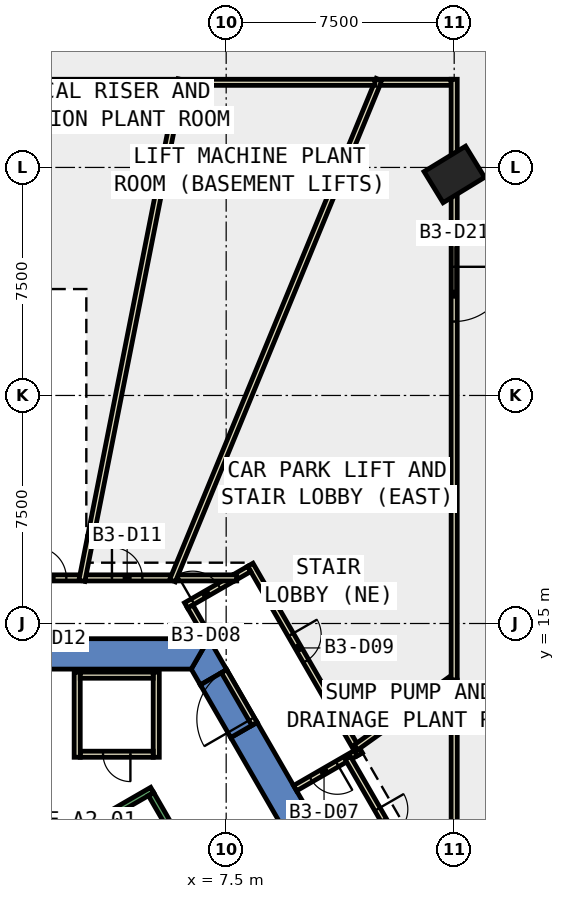
"""IFC4 building model, lengths in metres.
Left out: names, types, materials, properties, quantities, classifications, styles, units other than length and angle.
Written with IfcOpenShell. Run it as: python <this file> out.ifc"""

import sys

from ifc_helpers import new_model, si_unit, direction, frame, frame_2d, origin, origin_2d, place, context, subcontext, project, spatial, polyline, rectangle, outline, extrude, element, fill, save


model = new_model("IFC4")
c1 = context("Model", 3, precision=1e-05, world=origin(), true_north=direction((0.0, 1.0)))
c2 = subcontext(c1, "Body", "Model", "MODEL_VIEW")
j1 = project(units=[si_unit("LENGTHUNIT", "METRE"), si_unit("PLANEANGLEUNIT", "RADIAN")], contexts=[c1])
p1 = place(None, origin())
s1 = spatial("IfcSite", under=j1, at=p1, CompositionType="ELEMENT")
p2 = place(p1, origin())
s2 = spatial("IfcBuilding", under=s1, at=p2, CompositionType="ELEMENT")
p3 = place(p2, frame((0.0, 0.0, -16.5)))
s3 = spatial("IfcBuildingStorey", under=s2, at=p3, CompositionType="ELEMENT", Elevation=-16.5)
p4 = place(p3, frame((15.005, 29.769, -0.4), z_axis=(0.0, 0.0, 1.0), x_axis=(-0.521545830745, 0.853223268806, 0.0)))
e1 = element("IfcColumn", 1, at=p4, inside=s3, PredefinedType="COLUMN", context=c2, shape_type="SweptSolid", body=[
    extrude(rectangle(XDim=1.2, YDim=1.6, at=origin_2d()), origin(), (0.0, 0.0, 1.0), 5.48),
])
p5 = place(p3, origin())
e2 = element("IfcWall", 2, at=p5, inside=s3, PredefinedType="SHEAR", context=c2, shape_type="SweptSolid", body=[
    extrude(outline(polyline([(8.517, 11.748), (7.651, 11.248), (12.702, 2.5), (13.856, 2.5), (8.517, 11.748)])), origin(), (0.0, 0.0, 1.0), 5.08),
])
p6 = place(p3, origin())
e3 = element("IfcWall", 3, at=p6, inside=s3, PredefinedType="SHEAR", context=c2, shape_type="SweptSolid", body=[
    extrude(outline(polyline([(6.651, 12.98), (7.517, 13.48), (6.928, 14.5), (6.351, 13.5), (6.651, 12.98)])), origin(), (0.0, 0.0, 1.0), 5.08),
])
p7 = place(p3, frame((0.0, 0.0, 3.6)))
e4 = element("IfcWall", 4, at=p7, inside=s3, PredefinedType="SHEAR", context=c2, shape_type="SweptSolid", body=[
    extrude(outline(polyline([(7.517, 13.48), (6.651, 12.98), (7.651, 11.248), (8.517, 11.748), (7.517, 13.48)])), origin(), (0.0, 0.0, 1.0), 1.48),
])
p8 = place(p3, origin())
e5 = element("IfcWall", 5, at=p8, inside=s3, PredefinedType="SHEAR", context=c2, shape_type="SweptSolid", body=[
    extrude(outline(polyline([(6.928, 14.5), (-6.928, 14.5), (-6.351, 13.5), (6.351, 13.5), (6.928, 14.5)])), origin(), (0.0, 0.0, 1.0), 5.08),
])
p9 = place(p3, frame((11.845, 10.783, 0.0), z_axis=(0.0, 0.0, 1.0), x_axis=(-0.865973769406, -0.500089422704, 0.0)))
e6 = element("IfcWall", 6, at=p9, inside=s3, PredefinedType="PARTITIONING", context=c2, shape_type="SweptSolid", body=[
    extrude(rectangle(XDim=2.399, YDim=0.2, at=frame_2d((1.2, 0.0))), origin(), (0.0, 0.0, 1.0), 5.08),
])
p10 = place(p9, frame((0.8, 0.0, 0.0)))
e7 = element("IfcOpeningElement", 7, at=p10, cuts=e6, PredefinedType="OPENING", context=c2, shape_type="SweptSolid", body=[
    extrude(rectangle(XDim=1.0, YDim=2.1, at=frame_2d((0.5, 1.05))), frame((0.0, 0.11, 0.0), z_axis=(0.0, -1.0, 0.0), x_axis=(1.0, 0.0, 0.0)), (0.0, 0.0, 1.0), 0.22),
])
p11 = place(p3, frame((6.18, 15.595, 0.0), z_axis=(0.0, 0.0, 1.0), x_axis=(0.866102512622, 0.499866419787, 0.0)))
e8 = element("IfcWall", 8, at=p11, inside=s3, PredefinedType="PARTITIONING", context=c2, shape_type="SweptSolid", body=[
    extrude(rectangle(XDim=1.811, YDim=0.2, at=frame_2d((0.905, 0.0))), origin(), (0.0, 0.0, 1.0), 5.08),
])
p12 = place(p11, frame((0.254, 0.0, 0.0)))
e9 = element("IfcOpeningElement", 9, at=p12, cuts=e8, PredefinedType="OPENING", context=c2, shape_type="SweptSolid", body=[
    extrude(rectangle(XDim=1.0, YDim=2.1, at=frame_2d((0.5, 1.05))), frame((0.0, 0.11, 0.0), z_axis=(0.0, -1.0, 0.0), x_axis=(1.0, 0.0, 0.0)), (0.0, 0.0, 1.0), 0.22),
])
p13 = place(p3, frame((6.317, 15.558, 0.0), z_axis=(0.0, 0.0, 1.0), x_axis=(0.500114474492, -0.865959301817, 0.0)))
e10 = element("IfcWall", 10, at=p13, inside=s3, PredefinedType="PARTITIONING", context=c2, shape_type="SweptSolid", body=[
    extrude(rectangle(XDim=1.222, YDim=0.2, at=frame_2d((0.611, 0.0))), origin(), (0.0, 0.0, 1.0), 5.08),
])
p14 = place(p3, frame((8.295, 16.932, 0.0), z_axis=(0.0, 0.0, 1.0), x_axis=(0.499982693035, -0.866035395735, 0.0)))
e11 = element("IfcWall", 11, at=p14, inside=s3, PredefinedType="PARTITIONING", context=c2, shape_type="SweptSolid", body=[
    extrude(rectangle(XDim=7.2, YDim=0.2, at=frame_2d((3.6, 0.0))), origin(), (0.0, 0.0, 1.0), 5.08),
])
p15 = place(p14, frame((2.659, 0.0, 0.0)))
e12 = element("IfcOpeningElement", 12, at=p15, cuts=e11, PredefinedType="OPENING", context=c2, shape_type="SweptSolid", body=[
    extrude(rectangle(XDim=1.0, YDim=2.1, at=frame_2d((0.5, 1.05))), frame((0.0, 0.11, 0.0), z_axis=(0.0, -1.0, 0.0), x_axis=(1.0, 0.0, 0.0)), (0.0, 0.0, 1.0), 0.22),
])
p16 = place(p3, frame((7.748, 16.5, 0.0), z_axis=(0.0, 0.0, 1.0), x_axis=(0.865681519127, 0.500595153234, 0.0)))
e13 = element("IfcWall", 13, at=p16, inside=s3, PredefinedType="PARTITIONING", context=c2, shape_type="SweptSolid", body=[
    extrude(rectangle(XDim=0.589, YDim=0.2, at=frame_2d((0.294, 0.0))), origin(), (0.0, 0.0, 1.0), 5.08),
])
p17 = place(p3, frame((11.499, 10.583, 0.0), z_axis=(0.0, 0.0, 1.0), x_axis=(0.499994090379, -0.866028815679, 0.0)))
e14 = element("IfcWall", 14, at=p17, inside=s3, PredefinedType="PARTITIONING", context=c2, shape_type="SweptSolid", body=[
    extrude(rectangle(XDim=7.002, YDim=0.2, at=frame_2d((3.501, 0.0))), origin(), (0.0, 0.0, 1.0), 5.08),
])
p18 = place(p17, frame((1.952, 0.0, 0.0)))
e15 = element("IfcOpeningElement", 15, at=p18, cuts=e14, PredefinedType="OPENING", context=c2, shape_type="SweptSolid", body=[
    extrude(rectangle(XDim=1.0, YDim=2.1, at=frame_2d((0.5, 1.05))), frame((0.0, 0.11, 0.0), z_axis=(0.0, -1.0, 0.0), x_axis=(1.0, 0.0, 0.0)), (0.0, 0.0, 1.0), 0.22),
])
p19 = place(p3, frame((5.871, 16.5, 0.0), z_axis=(0.0, 0.0, 1.0), x_axis=(1.0, 0.0, 0.0)))
e16 = element("IfcWall", 16, at=p19, inside=s3, PredefinedType="PARTITIONING", context=c2, shape_type="SweptSolid", body=[
    extrude(rectangle(XDim=1.977, YDim=0.2, at=frame_2d((0.988, 0.0))), origin(), (0.0, 0.0, 1.0), 5.08),
])
p20 = place(p3, frame((2.872, 16.5, 0.0), z_axis=(0.0, 0.0, 1.0), x_axis=(1.0, 0.0, 0.0)))
e17 = element("IfcWall", 17, at=p20, inside=s3, PredefinedType="PARTITIONING", context=c2, shape_type="SweptSolid", body=[
    extrude(rectangle(XDim=2.799, YDim=0.2, at=frame_2d((1.399, 0.0))), origin(), (0.0, 0.0, 1.0), 5.08),
])
p21 = place(p20, frame((0.871, 0.0, 0.0)))
e18 = element("IfcOpeningElement", 18, at=p21, cuts=e17, PredefinedType="OPENING", context=c2, shape_type="SweptSolid", body=[
    extrude(rectangle(XDim=1.0, YDim=2.1, at=frame_2d((0.5, 1.05))), frame((0.0, 0.11, 0.0), z_axis=(0.0, -1.0, 0.0), x_axis=(1.0, 0.0, 0.0)), (0.0, 0.0, 1.0), 0.22),
])
p22 = place(p3, frame((0.45, 16.5, 0.0), z_axis=(0.0, 0.0, 1.0), x_axis=(1.0, 0.0, 0.0)))
e19 = element("IfcWall", 19, at=p22, inside=s3, PredefinedType="PARTITIONING", context=c2, shape_type="SweptSolid", body=[
    extrude(rectangle(XDim=2.222, YDim=0.2, at=frame_2d((1.111, 0.0))), origin(), (0.0, 0.0, 1.0), 5.08),
])
p23 = place(p22, frame((0.792, 0.0, 0.0)))
e20 = element("IfcOpeningElement", 20, at=p23, cuts=e19, PredefinedType="OPENING", context=c2, shape_type="SweptSolid", body=[
    extrude(rectangle(XDim=1.0, YDim=2.1, at=frame_2d((0.5, 1.05))), frame((0.0, 0.11, 0.0), z_axis=(0.0, -1.0, 0.0), x_axis=(1.0, 0.0, 0.0)), (0.0, 0.0, 1.0), 0.22),
])
p24 = place(p3, frame((14.919, 13.18, 0.0), z_axis=(0.0, 0.0, 1.0), x_axis=(-0.81313339858, -0.582077379833, 0.0)))
e21 = element("IfcWall", 21, at=p24, inside=s3, PredefinedType="PARTITIONING", context=c2, shape_type="SweptSolid", body=[
    extrude(rectangle(XDim=3.879, YDim=0.2, at=frame_2d((1.939, 0.0))), origin(), (0.0, 0.0, 1.0), 5.08),
])
p25 = place(p3, frame((5.733, 16.408, 0.0), z_axis=(0.0, 0.0, 1.0), x_axis=(0.381113406353, 0.924528296754, 0.0)))
e22 = element("IfcWall", 22, at=p25, inside=s3, PredefinedType="PARTITIONING", context=c2, shape_type="SweptSolid", body=[
    extrude(rectangle(XDim=17.83, YDim=0.2, at=frame_2d((8.915, 0.0))), origin(), (0.0, 0.0, 1.0), 5.08),
])
p26 = place(p3, frame((12.59, 32.8, 0.0), z_axis=(0.0, 0.0, 1.0), x_axis=(1.0, 0.0, 0.0)))
e23 = element("IfcWall", 23, at=p26, inside=s3, PredefinedType="PARTITIONING", context=c2, shape_type="SweptSolid", body=[
    extrude(rectangle(XDim=2.31, YDim=0.2, at=frame_2d((1.155, 0.0))), origin(), (0.0, 0.0, 1.0), 5.08),
])
p27 = place(p3, frame((15.0, 32.9, 0.0), z_axis=(0.0, 0.0, 1.0), x_axis=(0.0, -1.0, 0.0)))
e24 = element("IfcWall", 24, at=p27, inside=s3, PredefinedType="PARTITIONING", context=c2, shape_type="SweptSolid", body=[
    extrude(rectangle(XDim=19.762, YDim=0.2, at=frame_2d((9.881, 0.0))), origin(), (0.0, 0.0, 1.0), 5.08),
])
p28 = place(p27, frame((6.168, 0.0, 0.0)))
e25 = element("IfcOpeningElement", 25, at=p28, cuts=e24, PredefinedType="OPENING", context=c2, shape_type="SweptSolid", body=[
    extrude(rectangle(XDim=1.8, YDim=2.1, at=frame_2d((0.9, 1.05))), frame((0.0, 0.11, 0.0), z_axis=(0.0, -1.0, 0.0), x_axis=(1.0, 0.0, 0.0)), (0.0, 0.0, 1.0), 0.22),
])
p29 = place(p3, frame((15.0, 13.138, 0.0), z_axis=(0.0, 0.0, 1.0), x_axis=(0.0, -1.0, 0.0)))
e26 = element("IfcWall", 26, at=p29, inside=s3, PredefinedType="PARTITIONING", context=c2, shape_type="SweptSolid", body=[
    extrude(rectangle(XDim=8.719, YDim=0.2, at=frame_2d((4.359, 0.0))), origin(), (0.0, 0.0, 1.0), 5.08),
])
p30 = place(p3, frame((2.753, 16.402, 0.0), z_axis=(0.0, 0.0, 1.0), x_axis=(0.194225601905, 0.98095688772, 0.0)))
e27 = element("IfcWall", 27, at=p30, inside=s3, PredefinedType="PARTITIONING", context=c2, shape_type="SweptSolid", body=[
    extrude(rectangle(XDim=16.816, YDim=0.2, at=frame_2d((8.408, 0.0))), origin(), (0.0, 0.0, 1.0), 5.08),
])
p31 = place(p3, frame((6.1, 32.8, 0.0), z_axis=(0.0, 0.0, 1.0), x_axis=(1.0, 0.0, 0.0)))
e28 = element("IfcWall", 28, at=p31, inside=s3, PredefinedType="PARTITIONING", context=c2, shape_type="SweptSolid", body=[
    extrude(rectangle(XDim=6.29, YDim=0.2, at=frame_2d((3.145, 0.0))), origin(), (0.0, 0.0, 1.0), 5.08),
])
p32 = place(p3, frame((0.1, 32.8, 0.0), z_axis=(0.0, 0.0, 1.0), x_axis=(1.0, 0.0, 0.0)))
e29 = element("IfcWall", 29, at=p32, inside=s3, PredefinedType="PARTITIONING", context=c2, shape_type="SweptSolid", body=[
    extrude(rectangle(XDim=5.8, YDim=0.2, at=frame_2d((2.9, 0.0))), origin(), (0.0, 0.0, 1.0), 5.08),
])
p33 = place(p3, frame((5.2, 13.4, 0.0), z_axis=(0.0, 0.0, 1.0), x_axis=(0.0, -1.0, 0.0)))
e30 = element("IfcWall", 30, at=p33, inside=s3, PredefinedType="PARTITIONING", context=c2, shape_type="SweptSolid", body=[
    extrude(rectangle(XDim=2.8, YDim=0.2, at=frame_2d((1.4, 0.0))), origin(), (0.0, 0.0, 1.0), 5.08),
])
p34 = place(p3, frame((5.1, 10.7, 0.0), z_axis=(0.0, 0.0, 1.0), x_axis=(-1.0, 0.0, 0.0)))
e31 = element("IfcWall", 31, at=p34, inside=s3, PredefinedType="PARTITIONING", context=c2, shape_type="SweptSolid", body=[
    extrude(rectangle(XDim=2.4, YDim=0.2, at=frame_2d((1.2, 0.0))), origin(), (0.0, 0.0, 1.0), 5.08),
])
p35 = place(p34, frame((0.75, 0.0, 0.0)))
e32 = element("IfcOpeningElement", 32, at=p35, cuts=e31, PredefinedType="OPENING", context=c2, shape_type="SweptSolid", body=[
    extrude(rectangle(XDim=0.9, YDim=2.1, at=frame_2d((0.45, 1.05))), frame((0.0, 0.11, 0.0), z_axis=(0.0, -1.0, 0.0), x_axis=(1.0, 0.0, 0.0)), (0.0, 0.0, 1.0), 0.22),
])
p36 = place(p3, frame((2.6, 10.6, 0.0), z_axis=(0.0, 0.0, 1.0), x_axis=(0.0, 1.0, 0.0)))
e33 = element("IfcWall", 33, at=p36, inside=s3, PredefinedType="PARTITIONING", context=c2, shape_type="SweptSolid", body=[
    extrude(rectangle(XDim=2.8, YDim=0.2, at=frame_2d((1.4, 0.0))), origin(), (0.0, 0.0, 1.0), 5.08),
])
p37 = place(p3, frame((2.7, 13.3, 0.0), z_axis=(0.0, 0.0, 1.0), x_axis=(1.0, 0.0, 0.0)))
e34 = element("IfcWall", 34, at=p37, inside=s3, PredefinedType="PARTITIONING", context=c2, shape_type="SweptSolid", body=[
    extrude(rectangle(XDim=2.4, YDim=0.2, at=frame_2d((1.2, 0.0))), origin(), (0.0, 0.0, 1.0), 5.08),
])
p38 = place(p3, frame((8.43, 11.698, 0.0), z_axis=(0.0, 0.0, 1.0), x_axis=(-0.50002537861, 0.866010750942, 0.0)))
e35 = element("IfcWall", 35, at=p38, inside=s3, PredefinedType="PARTITIONING", context=c2, shape_type="SweptSolid", body=[
    extrude(rectangle(XDim=2.0, YDim=0.2, at=frame_2d((1.0, 0.0))), origin(), (0.0, 0.0, 1.0), 2.4),
])
p39 = place(p38, frame((0.19, 0.0, 0.0)))
e36 = element("IfcOpeningElement", 36, at=p39, cuts=e35, PredefinedType="OPENING", context=c2, shape_type="SweptSolid", body=[
    extrude(rectangle(XDim=1.8, YDim=2.1, at=frame_2d((0.9, 1.05))), frame((0.0, 0.11, 0.0), z_axis=(0.0, -1.0, 0.0), x_axis=(1.0, 0.0, 0.0)), (0.0, 0.0, 1.0), 0.22),
])
p40 = place(p3, frame((1.256, 7.324, 0.0), z_axis=(0.0, 0.0, 1.0), x_axis=(0.866046073146, 0.499964197906, 0.0)))
e37 = element("IfcWall", 37, at=p40, inside=s3, PredefinedType="STANDARD", context=c2, shape_type="SweptSolid", body=[
    extrude(rectangle(XDim=4.4, YDim=0.2, at=frame_2d((2.2, 0.0))), origin(), (0.0, 0.0, 1.0), 5.08),
])
p41 = place(p3, frame((8.48, 3.412, 0.0), z_axis=(0.0, 0.0, 1.0), x_axis=(-0.499978703459, 0.866037698999, 0.0)))
e38 = element("IfcWall", 38, at=p41, inside=s3, PredefinedType="STANDARD", context=c2, shape_type="SweptSolid", body=[
    extrude(rectangle(XDim=6.9, YDim=0.2, at=frame_2d((3.45, 0.0))), origin(), (0.0, 0.0, 1.0), 5.08),
])
p42 = place(p10, origin())
e39 = element("IfcDoor", 39, at=p42, inside=s3, OperationType="SINGLE_SWING_LEFT", PredefinedType="DOOR", context=c2, shape_type="SweptSolid", body=[
    extrude(rectangle(XDim=1.0, YDim=2.1, at=frame_2d((0.5, 1.05))), frame((0.0, 0.025, 0.0), z_axis=(0.0, -1.0, 0.0), x_axis=(1.0, 0.0, 0.0)), (0.0, 0.0, 1.0), 0.05),
])
fill(e7, e39)
p43 = place(p12, origin())
e40 = element("IfcDoor", 40, at=p43, inside=s3, OperationType="SINGLE_SWING_RIGHT", PredefinedType="DOOR", context=c2, shape_type="SweptSolid", body=[
    extrude(rectangle(XDim=1.0, YDim=2.1, at=frame_2d((0.5, 1.05))), frame((0.0, 0.025, 0.0), z_axis=(0.0, -1.0, 0.0), x_axis=(1.0, 0.0, 0.0)), (0.0, 0.0, 1.0), 0.05),
])
fill(e9, e40)
p44 = place(p15, origin())
e41 = element("IfcDoor", 41, at=p44, inside=s3, OperationType="SINGLE_SWING_LEFT", PredefinedType="DOOR", context=c2, shape_type="SweptSolid", body=[
    extrude(rectangle(XDim=1.0, YDim=2.1, at=frame_2d((0.5, 1.05))), frame((0.0, 0.025, 0.0), z_axis=(0.0, -1.0, 0.0), x_axis=(1.0, 0.0, 0.0)), (0.0, 0.0, 1.0), 0.05),
])
fill(e12, e41)
p45 = place(p18, origin())
e42 = element("IfcDoor", 42, at=p45, inside=s3, OperationType="SINGLE_SWING_RIGHT", PredefinedType="DOOR", context=c2, shape_type="SweptSolid", body=[
    extrude(rectangle(XDim=1.0, YDim=2.1, at=frame_2d((0.5, 1.05))), frame((0.0, 0.025, 0.0), z_axis=(0.0, -1.0, 0.0), x_axis=(1.0, 0.0, 0.0)), (0.0, 0.0, 1.0), 0.05),
])
fill(e15, e42)
p46 = place(p21, origin())
e43 = element("IfcDoor", 43, at=p46, inside=s3, OperationType="SINGLE_SWING_LEFT", PredefinedType="DOOR", context=c2, shape_type="SweptSolid", body=[
    extrude(rectangle(XDim=1.0, YDim=2.1, at=frame_2d((0.5, 1.05))), frame((0.0, 0.025, 0.0), z_axis=(0.0, -1.0, 0.0), x_axis=(1.0, 0.0, 0.0)), (0.0, 0.0, 1.0), 0.05),
])
fill(e18, e43)
p47 = place(p23, origin())
e44 = element("IfcDoor", 44, at=p47, inside=s3, OperationType="SINGLE_SWING_RIGHT", PredefinedType="DOOR", context=c2, shape_type="SweptSolid", body=[
    extrude(rectangle(XDim=1.0, YDim=2.1, at=frame_2d((0.5, 1.05))), frame((0.0, 0.025, 0.0), z_axis=(0.0, -1.0, 0.0), x_axis=(1.0, 0.0, 0.0)), (0.0, 0.0, 1.0), 0.05),
])
fill(e20, e44)
p48 = place(p28, origin())
e45 = element("IfcDoor", 45, at=p48, inside=s3, OperationType="DOUBLE_DOOR_SINGLE_SWING", PredefinedType="DOOR", context=c2, shape_type="SweptSolid", body=[
    extrude(rectangle(XDim=1.8, YDim=2.1, at=frame_2d((0.9, 1.05))), frame((0.0, 0.025, 0.0), z_axis=(0.0, -1.0, 0.0), x_axis=(1.0, 0.0, 0.0)), (0.0, 0.0, 1.0), 0.05),
])
fill(e25, e45)
p49 = place(p35, origin())
e46 = element("IfcDoor", 46, at=p49, inside=s3, OperationType="SINGLE_SWING_RIGHT", PredefinedType="DOOR", context=c2, shape_type="SweptSolid", body=[
    extrude(rectangle(XDim=0.9, YDim=2.1, at=frame_2d((0.45, 1.05))), frame((0.0, 0.025, 0.0), z_axis=(0.0, -1.0, 0.0), x_axis=(1.0, 0.0, 0.0)), (0.0, 0.0, 1.0), 0.05),
])
fill(e32, e46)
p50 = place(p39, origin())
e47 = element("IfcDoor", 47, at=p50, inside=s3, OperationType="DOUBLE_DOOR_SINGLE_SWING", PredefinedType="DOOR", context=c2, shape_type="SweptSolid", body=[
    extrude(rectangle(XDim=1.8, YDim=2.1, at=frame_2d((0.9, 1.05))), frame((0.0, 0.025, 0.0), z_axis=(0.0, -1.0, 0.0), x_axis=(1.0, 0.0, 0.0)), (0.0, 0.0, 1.0), 0.05),
])
fill(e36, e47)
save(model, sys.argv[1])
